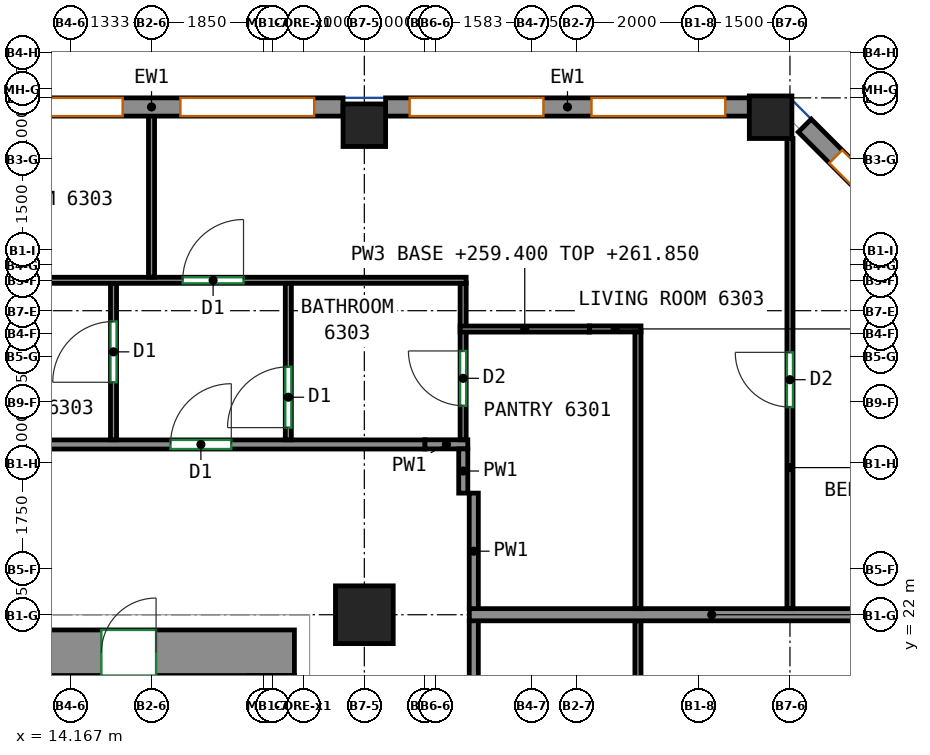
"""IFC4 building model, lengths in metres.
Left out: names, types, materials, properties, quantities, classifications, styles, units other than length and angle.
Written with IfcOpenShell. Run it as: python <this file> out.ifc"""

import sys

from ifc_helpers import new_model, si_unit, direction, frame, frame_2d, origin, origin_2d, place, context, subcontext, project, spatial, rectangle, extrude, source, transform, mapped, element, fill, save


model = new_model("IFC4")
c1 = context("Model", 3, precision=1e-05, world=origin(), true_north=direction((0.0, 1.0)))
c2 = subcontext(c1, "Body", "Model", "MODEL_VIEW")
j1 = project(units=[si_unit("LENGTHUNIT", "METRE"), si_unit("PLANEANGLEUNIT", "RADIAN")], contexts=[c1])
p1 = place(None, origin())
s1 = spatial("IfcSite", under=j1, at=p1, CompositionType="ELEMENT")
p2 = place(p1, origin())
s2 = spatial("IfcBuilding", under=s1, at=p2, CompositionType="ELEMENT")
p3 = place(p2, frame((0.0, 0.0, 259.4)))
s3 = spatial("IfcBuildingStorey", under=s2, at=p3, CompositionType="ELEMENT", Elevation=259.4)
m1 = source(origin(), c2, "Body", "SweptSolid", [
    extrude(rectangle(XDim=0.95, YDim=0.95, at=origin_2d()), origin(), (0.0, 0.0, 1.0), 3.0),
])
p4 = place(p3, frame((19.0, 22.0, 0.0), z_axis=(0.0, 0.0, 1.0), x_axis=(1.0, 0.0, 0.0)))
e1 = element("IfcColumn", 1, at=p4, inside=s3, PredefinedType="COLUMN", context=c2, shape_type="MappedRepresentation", body=[
    mapped(m1, transform((0.0, 0.0, 0.0))),
])
m2 = source(origin(), c2, "Body", "SweptSolid", [
    extrude(rectangle(XDim=0.7, YDim=0.7, at=origin_2d()), origin(), (0.0, 0.0, 1.0), 3.0),
])
for number, where, z_axis, x_axis in (
    (2, (19.0, 30.05, 0.0), (0.0, 0.0, 1.0), (1.0, 0.0, 0.0)),
    (3, (25.682, 30.182, 0.0), (0.0, 0.0, 1.0), (1.0, 0.0, 0.0)),
):
    element("IfcColumn", number, at=place(p3, frame(where, z_axis=z_axis, x_axis=x_axis)), inside=s3, PredefinedType="COLUMN", context=c2, shape_type="MappedRepresentation", body=[
        mapped(m2, transform((0.0, 0.0, 0.0))),
    ])
m3 = source(origin(), c2, "Body", "SweptSolid", [
    extrude(rectangle(XDim=33.6, YDim=0.75, at=frame_2d((16.8, 0.0))), origin(), (0.0, 0.0, 1.0), 3.0),
])
p5 = place(p3, frame((-15.75, 21.375, 0.0), z_axis=(0.0, 0.0, 1.0), x_axis=(1.0, 0.0, 0.0)))
e4 = element("IfcWall", 4, at=p5, inside=s3, PredefinedType="SHEAR", context=c2, shape_type="MappedRepresentation", body=[
    mapped(m3, transform((0.0, 0.0, 0.0))),
])
p6 = place(p5, frame((8.27, 0.0, 0.0)))
e5 = element("IfcOpeningElement", 5, at=p6, cuts=e4, PredefinedType="OPENING", context=c2, shape_type="SweptSolid", body=[
    extrude(rectangle(XDim=0.9, YDim=2.1, at=frame_2d((0.45, 1.05))), frame((0.0, 0.385, 0.0), z_axis=(0.0, -1.0, 0.0), x_axis=(1.0, 0.0, 0.0)), (0.0, 0.0, 1.0), 0.77),
])
p7 = place(p5, frame((14.3, 0.0, 0.0)))
e6 = element("IfcOpeningElement", 6, at=p7, cuts=e4, PredefinedType="OPENING", context=c2, shape_type="SweptSolid", body=[
    extrude(rectangle(XDim=0.9, YDim=2.1, at=frame_2d((0.45, 1.05))), frame((0.0, 0.385, 0.0), z_axis=(0.0, -1.0, 0.0), x_axis=(1.0, 0.0, 0.0)), (0.0, 0.0, 1.0), 0.77),
])
p8 = place(p5, frame((19.124, 0.0, 0.0)))
e7 = element("IfcOpeningElement", 7, at=p8, cuts=e4, PredefinedType="OPENING", context=c2, shape_type="SweptSolid", body=[
    extrude(rectangle(XDim=0.9, YDim=2.1, at=frame_2d((0.45, 1.05))), frame((0.0, 0.385, 0.0), z_axis=(0.0, -1.0, 0.0), x_axis=(1.0, 0.0, 0.0)), (0.0, 0.0, 1.0), 0.77),
])
p9 = place(p5, frame((23.814, 0.0, 0.0)))
e8 = element("IfcOpeningElement", 8, at=p9, cuts=e4, PredefinedType="OPENING", context=c2, shape_type="SweptSolid", body=[
    extrude(rectangle(XDim=0.9, YDim=2.1, at=frame_2d((0.45, 1.05))), frame((0.0, 0.385, 0.0), z_axis=(0.0, -1.0, 0.0), x_axis=(1.0, 0.0, 0.0)), (0.0, 0.0, 1.0), 0.77),
])
p10 = place(p5, frame((27.07, 0.0, 0.0)))
e9 = element("IfcOpeningElement", 9, at=p10, cuts=e4, PredefinedType="OPENING", context=c2, shape_type="SweptSolid", body=[
    extrude(rectangle(XDim=0.9, YDim=2.1, at=frame_2d((0.45, 1.05))), frame((0.0, 0.385, 0.0), z_axis=(0.0, -1.0, 0.0), x_axis=(1.0, 0.0, 0.0)), (0.0, 0.0, 1.0), 0.77),
])
p11 = place(p5, frame((2.275, 0.0, 0.0)))
e10 = element("IfcOpeningElement", 10, at=p11, cuts=e4, PredefinedType="OPENING", context=c2, shape_type="SweptSolid", body=[
    extrude(rectangle(XDim=0.9, YDim=2.1, at=frame_2d((0.45, 1.05))), frame((0.0, 0.385, 0.0), z_axis=(0.0, -1.0, 0.0), x_axis=(1.0, 0.0, 0.0)), (0.0, 0.0, 1.0), 0.77),
])
p12 = place(p5, frame((30.425, 0.0, 0.0)))
e11 = element("IfcOpeningElement", 11, at=p12, cuts=e4, PredefinedType="OPENING", context=c2, shape_type="SweptSolid", body=[
    extrude(rectangle(XDim=0.9, YDim=2.1, at=frame_2d((0.45, 1.05))), frame((0.0, 0.385, 0.0), z_axis=(0.0, -1.0, 0.0), x_axis=(1.0, 0.0, 0.0)), (0.0, 0.0, 1.0), 0.77),
])
m4 = source(origin(), c2, "Body", "SweptSolid", [
    extrude(rectangle(XDim=3.642, YDim=0.3, at=frame_2d((1.821, 0.0))), origin(), (0.0, 0.0, 1.0), 3.0),
])
p13 = place(p3, frame((28.819, 27.469, 0.0), z_axis=(0.0, 0.0, 1.0), x_axis=(-0.707106781187, 0.707106781187, 0.0)))
e12 = element("IfcWall", 12, at=p13, inside=s3, PredefinedType="SOLIDWALL", context=c2, shape_type="MappedRepresentation", body=[
    mapped(m4, transform((0.0, 0.0, 0.0))),
])
p14 = place(p13, frame((0.721, 0.0, 0.8)))
e13 = element("IfcOpeningElement", 13, at=p14, cuts=e12, PredefinedType="OPENING", context=c2, shape_type="SweptSolid", body=[
    extrude(rectangle(XDim=2.2, YDim=2.05, at=frame_2d((1.1, 1.025))), frame((0.0, 0.16, 0.0), z_axis=(0.0, -1.0, 0.0), x_axis=(1.0, 0.0, 0.0)), (0.0, 0.0, 1.0), 0.32),
])
m5 = source(origin(), c2, "Body", "SweptSolid", [
    extrude(rectangle(XDim=5.982, YDim=0.3, at=frame_2d((2.991, 0.0))), origin(), (0.0, 0.0, 1.0), 3.0),
])
p15 = place(p3, frame((25.332, 30.35, 0.0), z_axis=(0.0, 0.0, 1.0), x_axis=(-1.0, 0.0, 0.0)))
e14 = element("IfcWall", 14, at=p15, inside=s3, PredefinedType="SOLIDWALL", context=c2, shape_type="MappedRepresentation", body=[
    mapped(m5, transform((0.0, 0.0, 0.0))),
])
p16 = place(p15, frame((0.396, 0.0, 0.8)))
e15 = element("IfcOpeningElement", 15, at=p16, cuts=e14, PredefinedType="OPENING", context=c2, shape_type="SweptSolid", body=[
    extrude(rectangle(XDim=2.2, YDim=2.05, at=frame_2d((1.1, 1.025))), frame((0.0, 0.16, 0.0), z_axis=(0.0, -1.0, 0.0), x_axis=(1.0, 0.0, 0.0)), (0.0, 0.0, 1.0), 0.32),
])
p17 = place(p15, frame((3.386, 0.0, 0.8)))
e16 = element("IfcOpeningElement", 16, at=p17, cuts=e14, PredefinedType="OPENING", context=c2, shape_type="SweptSolid", body=[
    extrude(rectangle(XDim=2.2, YDim=2.05, at=frame_2d((1.1, 1.025))), frame((0.0, 0.16, 0.0), z_axis=(0.0, -1.0, 0.0), x_axis=(1.0, 0.0, 0.0)), (0.0, 0.0, 1.0), 0.32),
])
m6 = source(origin(), c2, "Body", "SweptSolid", [
    extrude(rectangle(XDim=6.3, YDim=0.3, at=frame_2d((3.15, 0.0))), origin(), (0.0, 0.0, 1.0), 3.0),
])
p18 = place(p3, frame((18.65, 30.35, 0.0), z_axis=(0.0, 0.0, 1.0), x_axis=(-1.0, 0.0, 0.0)))
e17 = element("IfcWall", 17, at=p18, inside=s3, PredefinedType="SOLIDWALL", context=c2, shape_type="MappedRepresentation", body=[
    mapped(m6, transform((0.0, 0.0, 0.0))),
])
p19 = place(p18, frame((0.475, 0.0, 0.8)))
e18 = element("IfcOpeningElement", 18, at=p19, cuts=e17, PredefinedType="OPENING", context=c2, shape_type="SweptSolid", body=[
    extrude(rectangle(XDim=2.2, YDim=2.05, at=frame_2d((1.1, 1.025))), frame((0.0, 0.16, 0.0), z_axis=(0.0, -1.0, 0.0), x_axis=(1.0, 0.0, 0.0)), (0.0, 0.0, 1.0), 0.32),
])
p20 = place(p18, frame((3.625, 0.0, 0.8)))
e19 = element("IfcOpeningElement", 19, at=p20, cuts=e17, PredefinedType="OPENING", context=c2, shape_type="SweptSolid", body=[
    extrude(rectangle(XDim=2.2, YDim=2.05, at=frame_2d((1.1, 1.025))), frame((0.0, 0.16, 0.0), z_axis=(0.0, -1.0, 0.0), x_axis=(1.0, 0.0, 0.0)), (0.0, 0.0, 1.0), 0.32),
])
p21 = place(p3, frame((-16.075, 24.8, 0.0), z_axis=(0.0, 0.0, 1.0), x_axis=(1.0, 0.0, 0.0)))
e20 = element("IfcWall", 20, at=p21, inside=s3, PredefinedType="PARTITIONING", context=c2, shape_type="SweptSolid", body=[
    extrude(rectangle(XDim=36.073, YDim=0.15, at=frame_2d((18.037, 0.0))), origin(), (0.0, 0.0, 1.0), 3.0),
])
p22 = place(p21, frame((5.919, 0.0, 0.0)))
e21 = element("IfcOpeningElement", 21, at=p22, cuts=e20, PredefinedType="OPENING", context=c2, shape_type="SweptSolid", body=[
    extrude(rectangle(XDim=1.8, YDim=2.1, at=frame_2d((0.9, 1.05))), frame((0.0, 0.085, 0.0), z_axis=(0.0, -1.0, 0.0), x_axis=(1.0, 0.0, 0.0)), (0.0, 0.0, 1.0), 0.17),
])
p23 = place(p21, frame((31.887, 0.0, 0.0)))
e22 = element("IfcOpeningElement", 22, at=p23, cuts=e20, PredefinedType="OPENING", context=c2, shape_type="SweptSolid", body=[
    extrude(rectangle(XDim=1.0, YDim=2.1, at=frame_2d((0.5, 1.05))), frame((0.0, 0.085, 0.0), z_axis=(0.0, -1.0, 0.0), x_axis=(1.0, 0.0, 0.0)), (0.0, 0.0, 1.0), 0.17),
])
p24 = place(p3, frame((20.8, 16.863, 0.0), z_axis=(0.0, 0.0, 1.0), x_axis=(0.0, 1.0, 0.0)))
e23 = element("IfcWall", 23, at=p24, inside=s3, PredefinedType="PARTITIONING", context=c2, shape_type="SweptSolid", body=[
    extrude(rectangle(XDim=5.047, YDim=0.15, at=frame_2d((2.523, 0.0))), origin(), (0.0, 0.0, 1.0), 3.0),
])
p25 = place(p3, frame((20.702, 24.802, 0.0), z_axis=(0.0, 0.0, 1.0), x_axis=(-1.0, 0.0, 0.0)))
e24 = element("IfcWall", 24, at=p25, inside=s3, PredefinedType="PARTITIONING", context=c2, shape_type="SweptSolid", body=[
    extrude(rectangle(XDim=0.704, YDim=0.15, at=frame_2d((0.352, 0.0))), origin(), (0.0, 0.0, 1.0), 3.0),
])
p26 = place(p3, frame((20.627, 24.0, 0.0), z_axis=(0.0, 0.0, 1.0), x_axis=(0.0, 1.0, 0.0)))
e25 = element("IfcWall", 25, at=p26, inside=s3, PredefinedType="PARTITIONING", context=c2, shape_type="SweptSolid", body=[
    extrude(rectangle(XDim=0.727, YDim=0.15, at=frame_2d((0.364, 0.0))), origin(), (0.0, 0.0, 1.0), 3.0),
])
p27 = place(p3, frame((20.8, 22.09, 0.0), z_axis=(0.0, 0.0, 1.0), x_axis=(0.0, 1.0, 0.0)))
e26 = element("IfcWall", 26, at=p27, inside=s3, PredefinedType="PARTITIONING", context=c2, shape_type="SweptSolid", body=[
    extrude(rectangle(XDim=1.91, YDim=0.15, at=frame_2d((0.955, 0.0))), origin(), (0.0, 0.0, 1.0), 3.0),
])
p28 = place(p3, frame((23.5, 16.873, 0.0), z_axis=(0.0, 0.0, 1.0), x_axis=(0.0, 1.0, 0.0)))
e27 = element("IfcWall", 27, at=p28, inside=s3, PredefinedType="PARTITIONING", context=c2, shape_type="SweptSolid", body=[
    extrude(rectangle(XDim=5.027, YDim=0.1, at=frame_2d((2.513, 0.0))), origin(), (0.0, 0.0, 1.0), 3.0),
])
p29 = place(p3, frame((20.727, 22.0, 0.0), z_axis=(0.0, 0.0, 1.0), x_axis=(1.0, 0.0, 0.0)))
e28 = element("IfcWall", 28, at=p29, inside=s3, PredefinedType="PARTITIONING", context=c2, shape_type="SweptSolid", body=[
    extrude(rectangle(XDim=7.973, YDim=0.2, at=frame_2d((3.986, 0.0))), origin(), (0.0, 0.0, 1.0), 2.45),
])
p30 = place(p3, frame((14.875, 24.877, 0.0), z_axis=(0.0, 0.0, 1.0), x_axis=(0.0, 1.0, 0.0)))
e29 = element("IfcWall", 29, at=p30, inside=s3, PredefinedType="PARTITIONING", context=c2, shape_type="SweptSolid", body=[
    extrude(rectangle(XDim=2.573, YDim=0.1, at=frame_2d((1.287, 0.0))), origin(), (0.0, 0.0, 1.0), 3.0),
])
p31 = place(p30, frame((0.946, 0.0, 0.0)))
e30 = element("IfcOpeningElement", 30, at=p31, cuts=e29, PredefinedType="OPENING", context=c2, shape_type="SweptSolid", body=[
    extrude(rectangle(XDim=1.0, YDim=2.1, at=frame_2d((0.5, 1.05))), frame((0.0, 0.06, 0.0), z_axis=(0.0, -1.0, 0.0), x_axis=(1.0, 0.0, 0.0)), (0.0, 0.0, 1.0), 0.12),
])
p32 = place(p3, frame((11.9, 27.5, 0.0), z_axis=(0.0, 0.0, 1.0), x_axis=(1.0, 0.0, 0.0)))
e31 = element("IfcWall", 31, at=p32, inside=s3, PredefinedType="PARTITIONING", context=c2, shape_type="SweptSolid", body=[
    extrude(rectangle(XDim=8.775, YDim=0.1, at=frame_2d((4.388, 0.0))), origin(), (0.0, 0.0, 1.0), 3.0),
])
p33 = place(p32, frame((0.409, 0.0, 0.0)))
e32 = element("IfcOpeningElement", 32, at=p33, cuts=e31, PredefinedType="OPENING", context=c2, shape_type="SweptSolid", body=[
    extrude(rectangle(XDim=0.9, YDim=2.1, at=frame_2d((0.45, 1.05))), frame((0.0, 0.06, 0.0), z_axis=(0.0, -1.0, 0.0), x_axis=(1.0, 0.0, 0.0)), (0.0, 0.0, 1.0), 0.12),
])
p34 = place(p32, frame((4.113, 0.0, 0.0)))
e33 = element("IfcOpeningElement", 33, at=p34, cuts=e31, PredefinedType="OPENING", context=c2, shape_type="SweptSolid", body=[
    extrude(rectangle(XDim=1.0, YDim=2.1, at=frame_2d((0.5, 1.05))), frame((0.0, 0.06, 0.0), z_axis=(0.0, -1.0, 0.0), x_axis=(1.0, 0.0, 0.0)), (0.0, 0.0, 1.0), 0.12),
])
p35 = place(p3, frame((17.75, 24.877, 0.0), z_axis=(0.0, 0.0, 1.0), x_axis=(0.0, 1.0, 0.0)))
e34 = element("IfcWall", 34, at=p35, inside=s3, PredefinedType="PARTITIONING", context=c2, shape_type="SweptSolid", body=[
    extrude(rectangle(XDim=2.573, YDim=0.1, at=frame_2d((1.287, 0.0))), origin(), (0.0, 0.0, 1.0), 3.0),
])
p36 = place(p35, frame((0.2, 0.0, 0.0)))
e35 = element("IfcOpeningElement", 35, at=p36, cuts=e34, PredefinedType="OPENING", context=c2, shape_type="SweptSolid", body=[
    extrude(rectangle(XDim=1.0, YDim=2.1, at=frame_2d((0.5, 1.05))), frame((0.0, 0.06, 0.0), z_axis=(0.0, -1.0, 0.0), x_axis=(1.0, 0.0, 0.0)), (0.0, 0.0, 1.0), 0.12),
])
p37 = place(p3, frame((20.625, 24.877, 0.0), z_axis=(0.0, 0.0, 1.0), x_axis=(0.0, 1.0, 0.0)))
e36 = element("IfcWall", 36, at=p37, inside=s3, PredefinedType="PARTITIONING", context=c2, shape_type="SweptSolid", body=[
    extrude(rectangle(XDim=1.781, YDim=0.1, at=frame_2d((0.891, 0.0))), origin(), (0.0, 0.0, 1.0), 3.0),
])
p38 = place(p37, frame((0.561, 0.0, 0.0)))
e37 = element("IfcOpeningElement", 37, at=p38, cuts=e36, PredefinedType="OPENING", context=c2, shape_type="SweptSolid", body=[
    extrude(rectangle(XDim=0.9, YDim=2.1, at=frame_2d((0.45, 1.05))), frame((0.0, 0.06, 0.0), z_axis=(0.0, -1.0, 0.0), x_axis=(1.0, 0.0, 0.0)), (0.0, 0.0, 1.0), 0.12),
])
p39 = place(p3, frame((20.625, 26.738, 0.0), z_axis=(0.0, 0.0, 1.0), x_axis=(0.0, 1.0, 0.0)))
e38 = element("IfcWall", 38, at=p39, inside=s3, PredefinedType="PARTITIONING", context=c2, shape_type="SweptSolid", body=[
    extrude(rectangle(XDim=0.712, YDim=0.1, at=frame_2d((0.356, 0.0))), origin(), (0.0, 0.0, 1.0), 3.0),
])
p40 = place(p3, frame((22.702, 26.698, 0.0), z_axis=(0.0, 0.0, 1.0), x_axis=(-1.0, 0.0, 0.0)))
e39 = element("IfcWall", 39, at=p40, inside=s3, PredefinedType="PARTITIONING", context=c2, shape_type="SweptSolid", body=[
    extrude(rectangle(XDim=2.127, YDim=0.1, at=frame_2d((1.063, 0.0))), origin(), (0.0, 0.0, 1.0), 2.45),
])
p41 = place(p3, frame((23.55, 26.7, 0.0), z_axis=(0.0, 0.0, 1.0), x_axis=(-1.0, 0.0, 0.0)))
e40 = element("IfcWall", 40, at=p41, inside=s3, PredefinedType="PARTITIONING", context=c2, shape_type="SweptSolid", body=[
    extrude(rectangle(XDim=0.848, YDim=0.1, at=frame_2d((0.424, 0.0))), origin(), (0.0, 0.0, 1.0), 2.45),
])
p42 = place(p3, frame((23.5, 22.1, 0.0), z_axis=(0.0, 0.0, 1.0), x_axis=(0.0, 1.0, 0.0)))
e41 = element("IfcWall", 41, at=p42, inside=s3, PredefinedType="PARTITIONING", context=c2, shape_type="SweptSolid", body=[
    extrude(rectangle(XDim=4.55, YDim=0.1, at=frame_2d((2.275, 0.0))), origin(), (0.0, 0.0, 1.0), 3.0),
])
p43 = place(p3, frame((15.5, 27.552, 0.0), z_axis=(0.0, 0.0, 1.0), x_axis=(0.0, 1.0, 0.0)))
e42 = element("IfcWall", 42, at=p43, inside=s3, PredefinedType="PARTITIONING", context=c2, shape_type="SweptSolid", body=[
    extrude(rectangle(XDim=2.698, YDim=0.1, at=frame_2d((1.349, 0.0))), origin(), (0.0, 0.0, 1.0), 3.0),
])
p44 = place(p3, frame((26.0, 22.1, 0.0), z_axis=(0.0, 0.0, 1.0), x_axis=(0.0, 1.0, 0.0)))
e43 = element("IfcWall", 43, at=p44, inside=s3, PredefinedType="PARTITIONING", context=c2, shape_type="SweptSolid", body=[
    extrude(rectangle(XDim=7.732, YDim=0.1, at=frame_2d((3.866, 0.0))), origin(), (0.0, 0.0, 1.0), 2.45),
])
p45 = place(p44, frame((3.315, 0.0, 0.0)))
e44 = element("IfcOpeningElement", 44, at=p45, cuts=e43, PredefinedType="OPENING", context=c2, shape_type="SweptSolid", body=[
    extrude(rectangle(XDim=0.9, YDim=2.1, at=frame_2d((0.45, 1.05))), frame((0.0, 0.06, 0.0), z_axis=(0.0, -1.0, 0.0), x_axis=(1.0, 0.0, 0.0)), (0.0, 0.0, 1.0), 0.12),
])
p46 = place(p14, origin())
e45 = element("IfcWindow", 45, at=p46, inside=s3, PartitioningType="SINGLE_PANEL", PredefinedType="WINDOW", context=c2, shape_type="SweptSolid", body=[
    extrude(rectangle(XDim=2.2, YDim=2.05, at=frame_2d((1.1, 1.025))), frame((0.0, 0.03, 0.0), z_axis=(0.0, -1.0, 0.0), x_axis=(1.0, 0.0, 0.0)), (0.0, 0.0, 1.0), 0.06),
])
fill(e13, e45)
p47 = place(p16, origin())
e46 = element("IfcWindow", 46, at=p47, inside=s3, PartitioningType="SINGLE_PANEL", PredefinedType="WINDOW", context=c2, shape_type="SweptSolid", body=[
    extrude(rectangle(XDim=2.2, YDim=2.05, at=frame_2d((1.1, 1.025))), frame((0.0, 0.03, 0.0), z_axis=(0.0, -1.0, 0.0), x_axis=(1.0, 0.0, 0.0)), (0.0, 0.0, 1.0), 0.06),
])
fill(e15, e46)
p48 = place(p17, origin())
e47 = element("IfcWindow", 47, at=p48, inside=s3, PartitioningType="SINGLE_PANEL", PredefinedType="WINDOW", context=c2, shape_type="SweptSolid", body=[
    extrude(rectangle(XDim=2.2, YDim=2.05, at=frame_2d((1.1, 1.025))), frame((0.0, 0.03, 0.0), z_axis=(0.0, -1.0, 0.0), x_axis=(1.0, 0.0, 0.0)), (0.0, 0.0, 1.0), 0.06),
])
fill(e16, e47)
p49 = place(p19, origin())
e48 = element("IfcWindow", 48, at=p49, inside=s3, PartitioningType="SINGLE_PANEL", PredefinedType="WINDOW", context=c2, shape_type="SweptSolid", body=[
    extrude(rectangle(XDim=2.2, YDim=2.05, at=frame_2d((1.1, 1.025))), frame((0.0, 0.03, 0.0), z_axis=(0.0, -1.0, 0.0), x_axis=(1.0, 0.0, 0.0)), (0.0, 0.0, 1.0), 0.06),
])
fill(e18, e48)
p50 = place(p20, origin())
e49 = element("IfcWindow", 49, at=p50, inside=s3, PartitioningType="SINGLE_PANEL", PredefinedType="WINDOW", context=c2, shape_type="SweptSolid", body=[
    extrude(rectangle(XDim=2.2, YDim=2.05, at=frame_2d((1.1, 1.025))), frame((0.0, 0.03, 0.0), z_axis=(0.0, -1.0, 0.0), x_axis=(1.0, 0.0, 0.0)), (0.0, 0.0, 1.0), 0.06),
])
fill(e19, e49)
p51 = place(p12, origin())
e50 = element("IfcDoor", 50, at=p51, inside=s3, OperationType="SINGLE_SWING_RIGHT", PredefinedType="DOOR", context=c2, shape_type="SweptSolid", body=[
    extrude(rectangle(XDim=0.9, YDim=2.1, at=frame_2d((0.45, 1.05))), frame((0.0, -0.23, 0.0), z_axis=(0.0, -1.0, 0.0), x_axis=(1.0, 0.0, 0.0)), (0.0, 0.0, 1.0), 0.05),
])
fill(e11, e50)
p52 = place(p23, origin())
e51 = element("IfcDoor", 51, at=p52, inside=s3, OperationType="SINGLE_SWING_RIGHT", PredefinedType="DOOR", context=c2, shape_type="SweptSolid", body=[
    extrude(rectangle(XDim=1.0, YDim=2.1, at=frame_2d((0.5, 1.05))), frame((0.0, 0.025, 0.0), z_axis=(0.0, -1.0, 0.0), x_axis=(1.0, 0.0, 0.0)), (0.0, 0.0, 1.0), 0.05),
])
fill(e22, e51)
p53 = place(p36, origin())
e52 = element("IfcDoor", 52, at=p53, inside=s3, OperationType="SINGLE_SWING_LEFT", PredefinedType="DOOR", context=c2, shape_type="SweptSolid", body=[
    extrude(rectangle(XDim=1.0, YDim=2.1, at=frame_2d((0.5, 1.05))), frame((0.0, 0.025, 0.0), z_axis=(0.0, -1.0, 0.0), x_axis=(1.0, 0.0, 0.0)), (0.0, 0.0, 1.0), 0.05),
])
fill(e35, e52)
p54 = place(p45, origin())
e53 = element("IfcDoor", 53, at=p54, inside=s3, OperationType="SINGLE_SWING_RIGHT", PredefinedType="DOOR", context=c2, shape_type="SweptSolid", body=[
    extrude(rectangle(XDim=0.9, YDim=2.1, at=frame_2d((0.45, 1.05))), frame((0.0, 0.025, 0.0), z_axis=(0.0, -1.0, 0.0), x_axis=(1.0, 0.0, 0.0)), (0.0, 0.0, 1.0), 0.05),
])
fill(e44, e53)
p55 = place(p38, origin())
e54 = element("IfcDoor", 54, at=p55, inside=s3, OperationType="SINGLE_SWING_RIGHT", PredefinedType="DOOR", context=c2, shape_type="SweptSolid", body=[
    extrude(rectangle(XDim=0.9, YDim=2.1, at=frame_2d((0.45, 1.05))), frame((0.0, 0.025, 0.0), z_axis=(0.0, -1.0, 0.0), x_axis=(1.0, 0.0, 0.0)), (0.0, 0.0, 1.0), 0.05),
])
fill(e37, e54)
p56 = place(p31, origin())
e55 = element("IfcDoor", 55, at=p56, inside=s3, OperationType="SINGLE_SWING_LEFT", PredefinedType="DOOR", context=c2, shape_type="SweptSolid", body=[
    extrude(rectangle(XDim=1.0, YDim=2.1, at=frame_2d((0.5, 1.05))), frame((0.0, 0.025, 0.0), z_axis=(0.0, -1.0, 0.0), x_axis=(1.0, 0.0, 0.0)), (0.0, 0.0, 1.0), 0.05),
])
fill(e30, e55)
p57 = place(p34, origin())
e56 = element("IfcDoor", 56, at=p57, inside=s3, OperationType="SINGLE_SWING_RIGHT", PredefinedType="DOOR", context=c2, shape_type="SweptSolid", body=[
    extrude(rectangle(XDim=1.0, YDim=2.1, at=frame_2d((0.5, 1.05))), frame((0.0, 0.025, 0.0), z_axis=(0.0, -1.0, 0.0), x_axis=(1.0, 0.0, 0.0)), (0.0, 0.0, 1.0), 0.05),
])
fill(e33, e56)
save(model, sys.argv[1])
